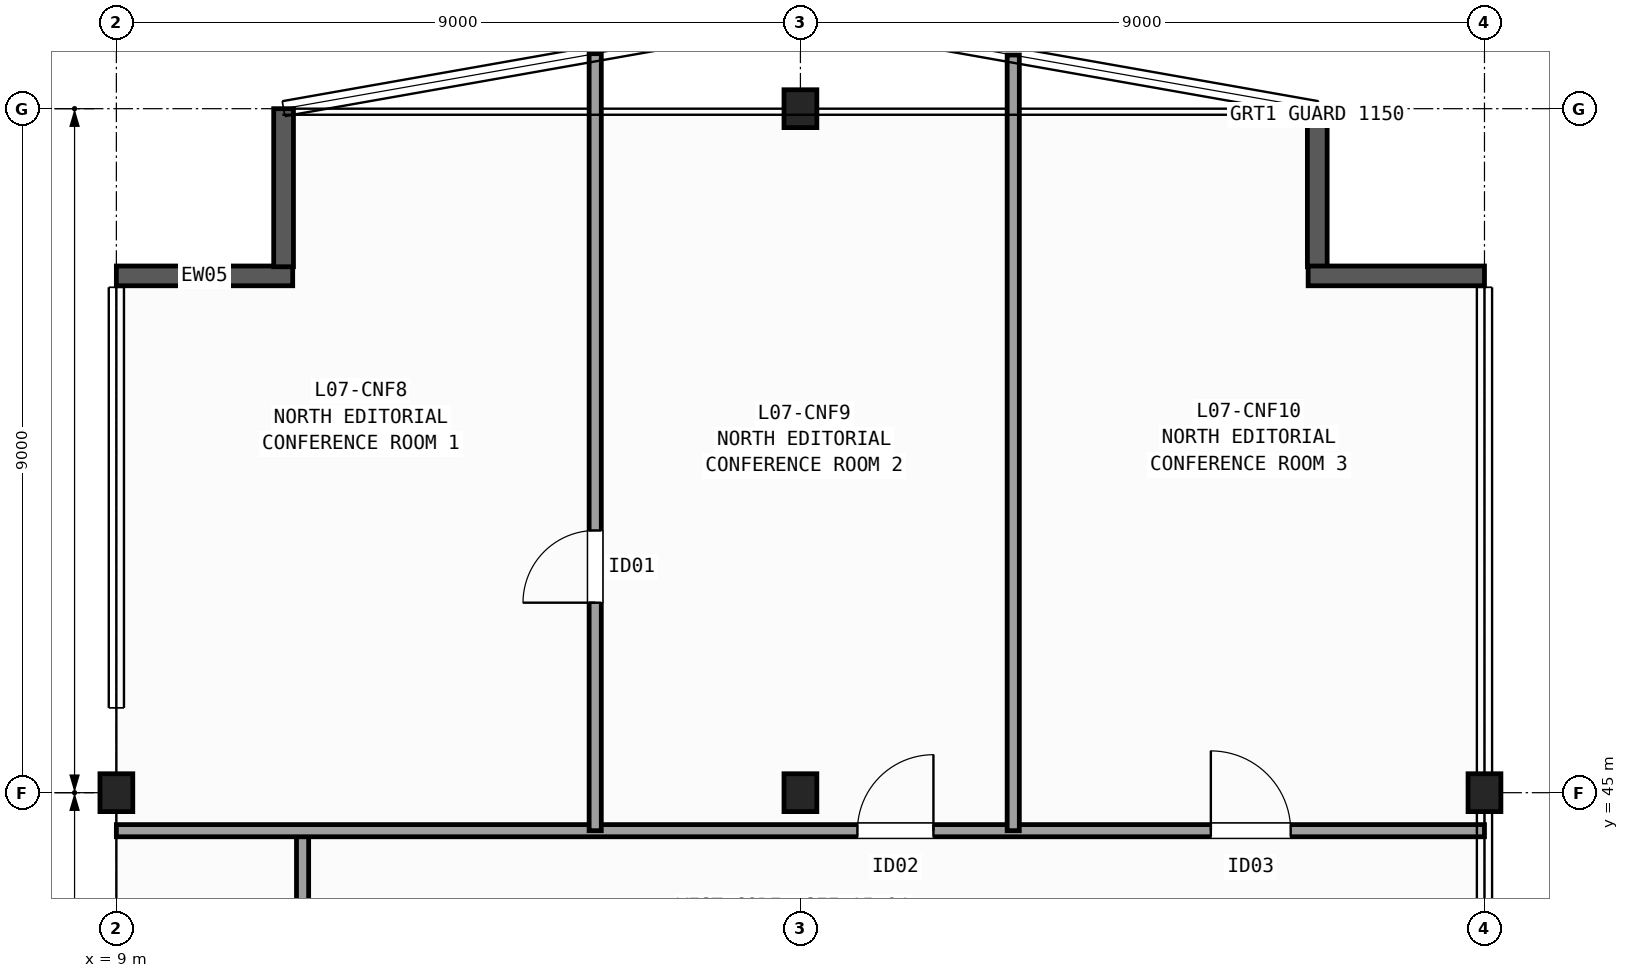
"""IFC4 building model, lengths in metres.
Left out: names, types, materials, properties, quantities, classifications, styles, units other than length and angle.
Written with IfcOpenShell. Run it as: python <this file> out.ifc"""

import sys

from ifc_helpers import new_model, si_unit, direction, frame, frame_2d, origin, origin_2d, place, context, subcontext, project, spatial, rectangle, i_section, extrude, element, fill, save


model = new_model("IFC4")
c1 = context("Model", 3, precision=1e-05, world=origin(), true_north=direction((0.0, 1.0)))
c2 = subcontext(c1, "Body", "Model", "MODEL_VIEW")
j1 = project(units=[si_unit("LENGTHUNIT", "METRE"), si_unit("PLANEANGLEUNIT", "RADIAN")], contexts=[c1])
p1 = place(None, origin())
s1 = spatial("IfcSite", under=j1, at=p1, CompositionType="ELEMENT")
p2 = place(p1, origin())
s2 = spatial("IfcBuilding", under=s1, at=p2, CompositionType="ELEMENT")
p3 = place(p2, frame((0.0, 0.0, 36.0)))
s3 = spatial("IfcBuildingStorey", under=s2, at=p3, CompositionType="ELEMENT", Elevation=36.0)
for number, where, z_axis, x_axis in (
    (1, (9.0, 45.0, 0.0), (0.0, 0.0, 1.0), (1.0, 0.0, 0.0)),
    (2, (18.0, 45.0, 0.0), (0.0, 0.0, 1.0), (1.0, 0.0, 0.0)),
    (3, (18.0, 54.0, 0.0), (0.0, 0.0, 1.0), (1.0, 0.0, 0.0)),
    (4, (27.0, 45.0, 0.0), (0.0, 0.0, 1.0), (1.0, 0.0, 0.0)),
):
    element("IfcColumn", number, at=place(p3, frame(where, z_axis=z_axis, x_axis=x_axis)), inside=s3, PredefinedType="COLUMN", context=c2, shape_type="SweptSolid", body=[
        extrude(i_section(OverallWidth=0.432, OverallDepth=0.498, WebThickness=0.056, FlangeThickness=0.089, FilletRadius=0.015, at=origin_2d()), origin(), (0.0, 0.0, 1.0), 3.7),
    ])
p4 = place(p3, frame((9.0, 51.8, 0.0), z_axis=(0.0, 0.0, 1.0), x_axis=(1.0, 0.0, 0.0)))
e5 = element("IfcWall", 5, at=p4, inside=s3, PredefinedType="SOLIDWALL", context=c2, shape_type="SweptSolid", body=[
    extrude(rectangle(XDim=2.32, YDim=0.26, at=frame_2d((1.16, 0.0))), origin(), (0.0, 0.0, 1.0), 3.42),
])
for number, where, z_axis, x_axis in (
    (6, (11.2, 51.92, 0.0), (0.0, 0.0, 1.0), (0.0, 1.0, 0.0)),
    (7, (24.8, 54.0, 0.0), (0.0, 0.0, 1.0), (0.0, -1.0, 0.0)),
):
    element("IfcWall", number, at=place(p3, frame(where, z_axis=z_axis, x_axis=x_axis)), inside=s3, PredefinedType="SOLIDWALL", context=c2, shape_type="SweptSolid", body=[
        extrude(rectangle(XDim=2.08, YDim=0.26, at=frame_2d((1.04, 0.0))), origin(), (0.0, 0.0, 1.0), 3.42),
    ])
p5 = place(p3, frame((24.68, 51.8, 0.0), z_axis=(0.0, 0.0, 1.0), x_axis=(1.0, 0.0, 0.0)))
e8 = element("IfcWall", 8, at=p5, inside=s3, PredefinedType="SOLIDWALL", context=c2, shape_type="SweptSolid", body=[
    extrude(rectangle(XDim=2.32, YDim=0.26, at=frame_2d((1.16, 0.0))), origin(), (0.0, 0.0, 1.0), 3.42),
])
p6 = place(p3, frame((11.45, 42.4, 0.0), z_axis=(0.0, 0.0, 1.0), x_axis=(0.0, 1.0, 0.0)))
e9 = element("IfcWall", 9, at=p6, inside=s3, PredefinedType="PARTITIONING", context=c2, shape_type="SweptSolid", body=[
    extrude(rectangle(XDim=2.1, YDim=0.16, at=frame_2d((1.05, 0.0))), origin(), (0.0, 0.0, 1.0), 3.42),
])
p7 = place(p3, frame((9.0, 44.5, 0.0), z_axis=(0.0, 0.0, 1.0), x_axis=(1.0, 0.0, 0.0)))
e10 = element("IfcWall", 10, at=p7, inside=s3, PredefinedType="PARTITIONING", context=c2, shape_type="SweptSolid", body=[
    extrude(rectangle(XDim=18.0, YDim=0.16, at=frame_2d((9.0, 0.0))), origin(), (0.0, 0.0, 1.0), 2.627),
])
p8 = place(p7, frame((9.75, 0.0, 0.0)))
e11 = element("IfcOpeningElement", 11, at=p8, cuts=e10, PredefinedType="OPENING", context=c2, shape_type="SweptSolid", body=[
    extrude(rectangle(XDim=1.0, YDim=2.1, at=frame_2d((0.5, 1.05))), frame((0.0, 0.09, 0.0), z_axis=(0.0, -1.0, 0.0), x_axis=(1.0, 0.0, 0.0)), (0.0, 0.0, 1.0), 0.18),
])
p9 = place(p7, frame((14.4, 0.0, 0.0)))
e12 = element("IfcOpeningElement", 12, at=p9, cuts=e10, PredefinedType="OPENING", context=c2, shape_type="SweptSolid", body=[
    extrude(rectangle(XDim=1.05, YDim=2.15, at=frame_2d((0.525, 1.075))), frame((0.0, 0.09, 0.0), z_axis=(0.0, -1.0, 0.0), x_axis=(1.0, 0.0, 0.0)), (0.0, 0.0, 1.0), 0.18),
])
p10 = place(p3, frame((15.3, 44.5, 0.0), z_axis=(0.0, 0.0, 1.0), x_axis=(0.0, 1.0, 0.0)))
e13 = element("IfcWall", 13, at=p10, inside=s3, PredefinedType="PARTITIONING", context=c2, shape_type="SweptSolid", body=[
    extrude(rectangle(XDim=10.224, YDim=0.16, at=frame_2d((5.112, 0.0))), origin(), (0.0, 0.0, 1.0), 3.42),
])
p11 = place(p10, frame((3.0, 0.0, 0.0)))
e14 = element("IfcOpeningElement", 14, at=p11, cuts=e13, PredefinedType="OPENING", context=c2, shape_type="SweptSolid", body=[
    extrude(rectangle(XDim=0.95, YDim=2.1, at=frame_2d((0.475, 1.05))), frame((0.0, 0.09, 0.0), z_axis=(0.0, -1.0, 0.0), x_axis=(1.0, 0.0, 0.0)), (0.0, 0.0, 1.0), 0.18),
])
p12 = place(p3, frame((20.8, 44.5, 0.0), z_axis=(0.0, 0.0, 1.0), x_axis=(0.0, 1.0, 0.0)))
e15 = element("IfcWall", 15, at=p12, inside=s3, PredefinedType="PARTITIONING", context=c2, shape_type="SweptSolid", body=[
    extrude(rectangle(XDim=10.206, YDim=0.16, at=frame_2d((5.103, 0.0))), origin(), (0.0, 0.0, 1.0), 3.42),
])
p13 = place(p11, origin())
e16 = element("IfcDoor", 16, at=p13, inside=s3, OperationType="SINGLE_SWING_LEFT", PredefinedType="DOOR", context=c2, shape_type="SweptSolid", body=[
    extrude(rectangle(XDim=0.95, YDim=2.1, at=frame_2d((0.475, 1.05))), frame((0.0, 0.025, 0.0), z_axis=(0.0, -1.0, 0.0), x_axis=(1.0, 0.0, 0.0)), (0.0, 0.0, 1.0), 0.05),
])
fill(e14, e16)
p14 = place(p8, origin())
e17 = element("IfcDoor", 17, at=p14, inside=s3, OperationType="SINGLE_SWING_RIGHT", PredefinedType="DOOR", context=c2, shape_type="SweptSolid", body=[
    extrude(rectangle(XDim=1.0, YDim=2.1, at=frame_2d((0.5, 1.05))), frame((0.0, 0.025, 0.0), z_axis=(0.0, -1.0, 0.0), x_axis=(1.0, 0.0, 0.0)), (0.0, 0.0, 1.0), 0.05),
])
fill(e11, e17)
p15 = place(p9, origin())
e18 = element("IfcDoor", 18, at=p15, inside=s3, OperationType="SINGLE_SWING_LEFT", PredefinedType="DOOR", context=c2, shape_type="SweptSolid", body=[
    extrude(rectangle(XDim=1.05, YDim=2.15, at=frame_2d((0.525, 1.075))), frame((0.0, 0.025, 0.0), z_axis=(0.0, -1.0, 0.0), x_axis=(1.0, 0.0, 0.0)), (0.0, 0.0, 1.0), 0.05),
])
fill(e12, e18)
save(model, sys.argv[1])
